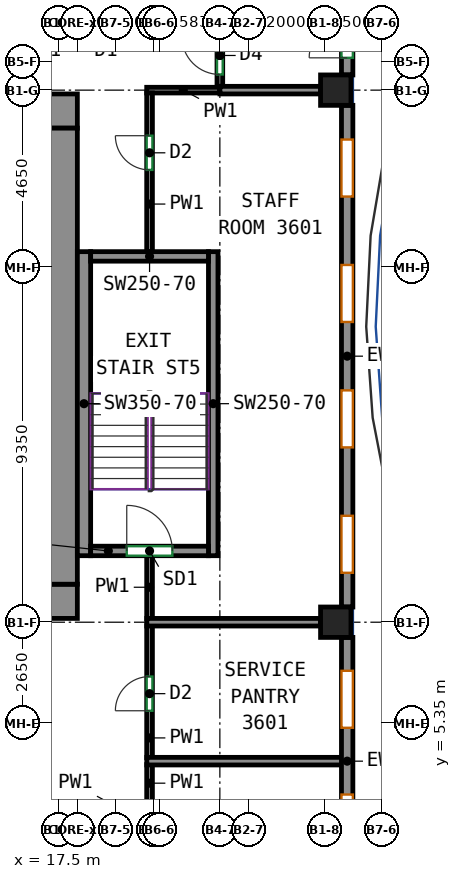
"""IFC4 building model, lengths in metres.
Left out: names, types, materials, properties, quantities, classifications, styles, units other than length and angle.
Written with IfcOpenShell. Run it as: python <this file> out.ifc"""

import sys

from ifc_helpers import new_model, si_unit, direction, frame, frame_2d, origin, origin_2d, place, context, subcontext, project, spatial, rectangle, extrude, source, transform, mapped, element, fill, save


model = new_model("IFC4")
c1 = context("Model", 3, precision=1e-05, world=origin(), true_north=direction((0.0, 1.0)))
c2 = subcontext(c1, "Body", "Model", "MODEL_VIEW")
j1 = project(units=[si_unit("LENGTHUNIT", "METRE"), si_unit("PLANEANGLEUNIT", "RADIAN")], contexts=[c1])
p1 = place(None, origin())
s1 = spatial("IfcSite", under=j1, at=p1, CompositionType="ELEMENT")
p2 = place(p1, origin())
s2 = spatial("IfcBuilding", under=s1, at=p2, CompositionType="ELEMENT")
p3 = place(p2, frame((0.0, 0.0, 157.5)))
s3 = spatial("IfcBuildingStorey", under=s2, at=p3, CompositionType="ELEMENT", Elevation=157.5)
m1 = source(origin(), c2, "Body", "SweptSolid", [
    extrude(rectangle(XDim=0.8, YDim=0.8, at=origin_2d()), origin(), (0.0, 0.0, 1.0), 3.12),
])
for number, where, z_axis, x_axis in (
    (1, (24.8, 8.0, 0.0), (0.0, 0.0, 1.0), (1.0, 0.0, 0.0)),
    (2, (24.8, 22.0, 0.0), (0.0, 0.0, 1.0), (1.0, 0.0, 0.0)),
):
    element("IfcColumn", number, at=place(p3, frame(where, z_axis=z_axis, x_axis=x_axis)), inside=s3, PredefinedType="COLUMN", context=c2, shape_type="MappedRepresentation", body=[
        mapped(m1, transform((0.0, 0.0, 0.0))),
    ])
m2 = source(origin(), c2, "Body", "SweptSolid", [
    extrude(rectangle(XDim=5.53, YDim=0.9, at=frame_2d((2.765, 0.0))), origin(), (0.0, 0.0, 1.0), 3.12),
])
p4 = place(p3, frame((12.47, 8.55, 0.0), z_axis=(0.0, 0.0, 1.0), x_axis=(1.0, 0.0, 0.0)))
e3 = element("IfcWall", 3, at=p4, inside=s3, PredefinedType="SHEAR", context=c2, shape_type="MappedRepresentation", body=[
    mapped(m2, transform((0.0, 0.0, 0.0))),
])
p5 = place(p4, frame((2.18, 0.0, 0.0)))
e4 = element("IfcOpeningElement", 4, at=p5, cuts=e3, PredefinedType="OPENING", context=c2, shape_type="SweptSolid", body=[
    extrude(rectangle(XDim=1.2, YDim=2.1, at=frame_2d((0.6, 1.05))), frame((0.0, 0.46, 0.0), z_axis=(0.0, -1.0, 0.0), x_axis=(1.0, 0.0, 0.0)), (0.0, 0.0, 1.0), 0.92),
])
m3 = source(origin(), c2, "Body", "SweptSolid", [
    extrude(rectangle(XDim=33.9, YDim=0.9, at=frame_2d((16.95, 0.0))), origin(), (0.0, 0.0, 1.0), 3.12),
])
p6 = place(p3, frame((-15.9, 21.45, 0.0), z_axis=(0.0, 0.0, 1.0), x_axis=(1.0, 0.0, 0.0)))
e5 = element("IfcWall", 5, at=p6, inside=s3, PredefinedType="SHEAR", context=c2, shape_type="MappedRepresentation", body=[
    mapped(m3, transform((0.0, 0.0, 0.0))),
])
p7 = place(p6, frame((8.42, 0.0, 0.0)))
e6 = element("IfcOpeningElement", 6, at=p7, cuts=e5, PredefinedType="OPENING", context=c2, shape_type="SweptSolid", body=[
    extrude(rectangle(XDim=0.9, YDim=2.1, at=frame_2d((0.45, 1.05))), frame((0.0, 0.46, 0.0), z_axis=(0.0, -1.0, 0.0), x_axis=(1.0, 0.0, 0.0)), (0.0, 0.0, 1.0), 0.92),
])
p8 = place(p6, frame((15.12, 0.0, 0.0)))
e7 = element("IfcOpeningElement", 7, at=p8, cuts=e5, PredefinedType="OPENING", context=c2, shape_type="SweptSolid", body=[
    extrude(rectangle(XDim=0.9, YDim=2.1, at=frame_2d((0.45, 1.05))), frame((0.0, 0.46, 0.0), z_axis=(0.0, -1.0, 0.0), x_axis=(1.0, 0.0, 0.0)), (0.0, 0.0, 1.0), 0.92),
])
p9 = place(p6, frame((19.944, 0.0, 0.0)))
e8 = element("IfcOpeningElement", 8, at=p9, cuts=e5, PredefinedType="OPENING", context=c2, shape_type="SweptSolid", body=[
    extrude(rectangle(XDim=0.9, YDim=2.1, at=frame_2d((0.45, 1.05))), frame((0.0, 0.46, 0.0), z_axis=(0.0, -1.0, 0.0), x_axis=(1.0, 0.0, 0.0)), (0.0, 0.0, 1.0), 0.92),
])
p10 = place(p6, frame((25.304, 0.0, 0.0)))
e9 = element("IfcOpeningElement", 9, at=p10, cuts=e5, PredefinedType="OPENING", context=c2, shape_type="SweptSolid", body=[
    extrude(rectangle(XDim=0.9, YDim=2.1, at=frame_2d((0.45, 1.05))), frame((0.0, 0.46, 0.0), z_axis=(0.0, -1.0, 0.0), x_axis=(1.0, 0.0, 0.0)), (0.0, 0.0, 1.0), 0.92),
])
p11 = place(p6, frame((2.425, 0.0, 0.0)))
e10 = element("IfcOpeningElement", 10, at=p11, cuts=e5, PredefinedType="OPENING", context=c2, shape_type="SweptSolid", body=[
    extrude(rectangle(XDim=0.9, YDim=2.1, at=frame_2d((0.45, 1.05))), frame((0.0, 0.46, 0.0), z_axis=(0.0, -1.0, 0.0), x_axis=(1.0, 0.0, 0.0)), (0.0, 0.0, 1.0), 0.92),
])
p12 = place(p6, frame((30.575, 0.0, 0.0)))
e11 = element("IfcOpeningElement", 11, at=p12, cuts=e5, PredefinedType="OPENING", context=c2, shape_type="SweptSolid", body=[
    extrude(rectangle(XDim=0.9, YDim=2.1, at=frame_2d((0.45, 1.05))), frame((0.0, 0.46, 0.0), z_axis=(0.0, -1.0, 0.0), x_axis=(1.0, 0.0, 0.0)), (0.0, 0.0, 1.0), 0.92),
])
m4 = source(origin(), c2, "Body", "SweptSolid", [
    extrude(rectangle(XDim=12.0, YDim=0.9, at=frame_2d((6.0, 0.0))), origin(), (0.0, 0.0, 1.0), 3.12),
])
p13 = place(p3, frame((17.55, 9.0, 0.0), z_axis=(0.0, 0.0, 1.0), x_axis=(0.0, 1.0, 0.0)))
e12 = element("IfcWall", 12, at=p13, inside=s3, PredefinedType="SHEAR", context=c2, shape_type="MappedRepresentation", body=[
    mapped(m4, transform((0.0, 0.0, 0.0))),
])
m5 = source(origin(), c2, "Body", "SweptSolid", [
    extrude(rectangle(XDim=8.0, YDim=0.35, at=frame_2d((4.0, 0.0))), origin(), (0.0, 0.0, 1.0), 3.12),
])
p14 = place(p3, frame((18.175, 9.75, 0.0), z_axis=(0.0, 0.0, 1.0), x_axis=(0.0, 1.0, 0.0)))
e13 = element("IfcWall", 13, at=p14, inside=s3, PredefinedType="SHEAR", context=c2, shape_type="MappedRepresentation", body=[
    mapped(m5, transform((0.0, 0.0, 0.0))),
])
m6 = source(origin(), c2, "Body", "SweptSolid", [
    extrude(rectangle(XDim=8.0, YDim=0.25, at=frame_2d((4.0, 0.0))), origin(), (0.0, 0.0, 1.0), 3.12),
])
p15 = place(p3, frame((21.575, 9.75, 0.0), z_axis=(0.0, 0.0, 1.0), x_axis=(0.0, 1.0, 0.0)))
e14 = element("IfcWall", 14, at=p15, inside=s3, PredefinedType="SHEAR", context=c2, shape_type="MappedRepresentation", body=[
    mapped(m6, transform((0.0, 0.0, 0.0))),
])
m7 = source(origin(), c2, "Body", "SweptSolid", [
    extrude(rectangle(XDim=3.1, YDim=0.25, at=frame_2d((1.55, 0.0))), origin(), (0.0, 0.0, 1.0), 3.12),
])
p16 = place(p3, frame((18.35, 9.875, 0.0), z_axis=(0.0, 0.0, 1.0), x_axis=(1.0, 0.0, 0.0)))
e15 = element("IfcWall", 15, at=p16, inside=s3, PredefinedType="SHEAR", context=c2, shape_type="MappedRepresentation", body=[
    mapped(m7, transform((0.0, 0.0, 0.0))),
])
p17 = place(p16, frame((0.95, 0.0, 0.0)))
e16 = element("IfcOpeningElement", 16, at=p17, cuts=e15, PredefinedType="OPENING", context=c2, shape_type="SweptSolid", body=[
    extrude(rectangle(XDim=1.2, YDim=2.1, at=frame_2d((0.6, 1.05))), frame((0.0, 0.135, 0.0), z_axis=(0.0, -1.0, 0.0), x_axis=(1.0, 0.0, 0.0)), (0.0, 0.0, 1.0), 0.27),
])
p18 = place(p3, frame((18.35, 17.625, 0.0), z_axis=(0.0, 0.0, 1.0), x_axis=(1.0, 0.0, 0.0)))
e17 = element("IfcWall", 17, at=p18, inside=s3, PredefinedType="SHEAR", context=c2, shape_type="MappedRepresentation", body=[
    mapped(m7, transform((0.0, 0.0, 0.0))),
])
m8 = source(origin(), c2, "Body", "SweptSolid", [
    extrude(rectangle(XDim=6.513, YDim=0.3, at=frame_2d((3.256, 0.0))), origin(), (0.0, 0.0, 1.0), 3.12),
])
p19 = place(p3, frame((25.1, 1.087, 0.0), z_axis=(0.0, 0.0, 1.0), x_axis=(0.0, 1.0, 0.0)))
e18 = element("IfcWall", 18, at=p19, inside=s3, PredefinedType="SOLIDWALL", context=c2, shape_type="MappedRepresentation", body=[
    mapped(m8, transform((0.0, 0.0, 0.0))),
])
p20 = place(p19, frame((0.878, 0.0, 0.85)))
e19 = element("IfcOpeningElement", 19, at=p20, cuts=e18, PredefinedType="OPENING", context=c2, shape_type="SweptSolid", body=[
    extrude(rectangle(XDim=1.5, YDim=1.95, at=frame_2d((0.75, 0.975))), frame((0.0, 0.16, 0.0), z_axis=(0.0, -1.0, 0.0), x_axis=(1.0, 0.0, 0.0)), (0.0, 0.0, 1.0), 0.32),
])
p21 = place(p19, frame((4.135, 0.0, 0.85)))
e20 = element("IfcOpeningElement", 20, at=p21, cuts=e18, PredefinedType="OPENING", context=c2, shape_type="SweptSolid", body=[
    extrude(rectangle(XDim=1.5, YDim=1.95, at=frame_2d((0.75, 0.975))), frame((0.0, 0.16, 0.0), z_axis=(0.0, -1.0, 0.0), x_axis=(1.0, 0.0, 0.0)), (0.0, 0.0, 1.0), 0.32),
])
m9 = source(origin(), c2, "Body", "SweptSolid", [
    extrude(rectangle(XDim=13.2, YDim=0.3, at=frame_2d((6.6, 0.0))), origin(), (0.0, 0.0, 1.0), 3.12),
])
p22 = place(p3, frame((25.1, 8.4, 0.0), z_axis=(0.0, 0.0, 1.0), x_axis=(0.0, 1.0, 0.0)))
e21 = element("IfcWall", 21, at=p22, inside=s3, PredefinedType="SOLIDWALL", context=c2, shape_type="MappedRepresentation", body=[
    mapped(m9, transform((0.0, 0.0, 0.0))),
])
p23 = place(p22, frame((0.9, 0.0, 0.85)))
e22 = element("IfcOpeningElement", 22, at=p23, cuts=e21, PredefinedType="OPENING", context=c2, shape_type="SweptSolid", body=[
    extrude(rectangle(XDim=1.5, YDim=1.95, at=frame_2d((0.75, 0.975))), frame((0.0, 0.16, 0.0), z_axis=(0.0, -1.0, 0.0), x_axis=(1.0, 0.0, 0.0)), (0.0, 0.0, 1.0), 0.32),
])
p24 = place(p22, frame((4.2, 0.0, 0.85)))
e23 = element("IfcOpeningElement", 23, at=p24, cuts=e21, PredefinedType="OPENING", context=c2, shape_type="SweptSolid", body=[
    extrude(rectangle(XDim=1.5, YDim=1.95, at=frame_2d((0.75, 0.975))), frame((0.0, 0.16, 0.0), z_axis=(0.0, -1.0, 0.0), x_axis=(1.0, 0.0, 0.0)), (0.0, 0.0, 1.0), 0.32),
])
p25 = place(p22, frame((7.5, 0.0, 0.85)))
e24 = element("IfcOpeningElement", 24, at=p25, cuts=e21, PredefinedType="OPENING", context=c2, shape_type="SweptSolid", body=[
    extrude(rectangle(XDim=1.5, YDim=1.95, at=frame_2d((0.75, 0.975))), frame((0.0, 0.16, 0.0), z_axis=(0.0, -1.0, 0.0), x_axis=(1.0, 0.0, 0.0)), (0.0, 0.0, 1.0), 0.32),
])
p26 = place(p22, frame((10.8, 0.0, 0.85)))
e25 = element("IfcOpeningElement", 25, at=p26, cuts=e21, PredefinedType="OPENING", context=c2, shape_type="SweptSolid", body=[
    extrude(rectangle(XDim=1.5, YDim=1.95, at=frame_2d((0.75, 0.975))), frame((0.0, 0.16, 0.0), z_axis=(0.0, -1.0, 0.0), x_axis=(1.0, 0.0, 0.0)), (0.0, 0.0, 1.0), 0.32),
])
m10 = source(origin(), c2, "Body", "SweptSolid", [
    extrude(rectangle(XDim=4.95, YDim=0.3, at=frame_2d((2.475, 0.0))), origin(), (0.0, 0.0, 1.0), 3.12),
])
p27 = place(p3, frame((25.1, 22.4, 0.0), z_axis=(0.0, 0.0, 1.0), x_axis=(0.0, 1.0, 0.0)))
e26 = element("IfcWall", 26, at=p27, inside=s3, PredefinedType="SOLIDWALL", context=c2, shape_type="MappedRepresentation", body=[
    mapped(m10, transform((0.0, 0.0, 0.0))),
])
p28 = place(p27, frame((1.75, 0.0, 0.85)))
e27 = element("IfcOpeningElement", 27, at=p28, cuts=e26, PredefinedType="OPENING", context=c2, shape_type="SweptSolid", body=[
    extrude(rectangle(XDim=1.5, YDim=1.95, at=frame_2d((0.75, 0.975))), frame((0.0, 0.16, 0.0), z_axis=(0.0, -1.0, 0.0), x_axis=(1.0, 0.0, 0.0)), (0.0, 0.0, 1.0), 0.32),
])
p29 = place(p27, frame((0.45, 0.0, 0.0)))
e28 = element("IfcOpeningElement", 28, at=p29, cuts=e26, PredefinedType="OPENING", context=c2, shape_type="SweptSolid", body=[
    extrude(rectangle(XDim=1.0, YDim=2.1, at=frame_2d((0.5, 1.05))), frame((0.0, 0.16, 0.0), z_axis=(0.0, -1.0, 0.0), x_axis=(1.0, 0.0, 0.0)), (0.0, 0.0, 1.0), 0.32),
])
p30 = place(p3, frame((21.75, 22.1, 0.0), z_axis=(0.0, 0.0, 1.0), x_axis=(0.0, 1.0, 0.0)))
e29 = element("IfcWall", 29, at=p30, inside=s3, PredefinedType="PARTITIONING", context=c2, shape_type="SweptSolid", body=[
    extrude(rectangle(XDim=1.625, YDim=0.15, at=frame_2d((0.812, 0.0))), origin(), (0.0, 0.0, 1.0), 3.12),
])
p31 = place(p30, frame((0.312, 0.0, 0.0)))
e30 = element("IfcOpeningElement", 30, at=p31, cuts=e29, PredefinedType="OPENING", context=c2, shape_type="SweptSolid", body=[
    extrude(rectangle(XDim=1.0, YDim=2.1, at=frame_2d((0.5, 1.05))), frame((0.0, 0.085, 0.0), z_axis=(0.0, -1.0, 0.0), x_axis=(1.0, 0.0, 0.0)), (0.0, 0.0, 1.0), 0.17),
])
p32 = place(p3, frame((19.9, 4.434, 0.0), z_axis=(0.0, 0.0, 1.0), x_axis=(0.0, 1.0, 0.0)))
e31 = element("IfcWall", 31, at=p32, inside=s3, PredefinedType="PARTITIONING", context=c2, shape_type="SweptSolid", body=[
    extrude(rectangle(XDim=3.476, YDim=0.15, at=frame_2d((1.738, 0.0))), origin(), (0.0, 0.0, 1.0), 3.12),
])
p33 = place(p32, frame((1.236, 0.0, 0.0)))
e32 = element("IfcOpeningElement", 32, at=p33, cuts=e31, PredefinedType="OPENING", context=c2, shape_type="SweptSolid", body=[
    extrude(rectangle(XDim=0.9, YDim=2.1, at=frame_2d((0.45, 1.05))), frame((0.0, 0.085, 0.0), z_axis=(0.0, -1.0, 0.0), x_axis=(1.0, 0.0, 0.0)), (0.0, 0.0, 1.0), 0.17),
])
p34 = place(p3, frame((19.825, 22.0, 0.0), z_axis=(0.0, 0.0, 1.0), x_axis=(1.0, 0.0, 0.0)))
e33 = element("IfcWall", 33, at=p34, inside=s3, PredefinedType="PARTITIONING", context=c2, shape_type="SweptSolid", body=[
    extrude(rectangle(XDim=1.925, YDim=0.15, at=frame_2d((0.962, 0.0))), origin(), (0.0, 0.0, 1.0), 3.12),
])
p35 = place(p3, frame((19.9, 17.75, 0.0), z_axis=(0.0, 0.0, 1.0), x_axis=(0.0, 1.0, 0.0)))
e34 = element("IfcWall", 34, at=p35, inside=s3, PredefinedType="PARTITIONING", context=c2, shape_type="SweptSolid", body=[
    extrude(rectangle(XDim=4.175, YDim=0.15, at=frame_2d((2.087, 0.0))), origin(), (0.0, 0.0, 1.0), 3.12),
])
p36 = place(p35, frame((2.151, 0.0, 0.0)))
e35 = element("IfcOpeningElement", 35, at=p36, cuts=e34, PredefinedType="OPENING", context=c2, shape_type="SweptSolid", body=[
    extrude(rectangle(XDim=0.9, YDim=2.1, at=frame_2d((0.45, 1.05))), frame((0.0, 0.085, 0.0), z_axis=(0.0, -1.0, 0.0), x_axis=(1.0, 0.0, 0.0)), (0.0, 0.0, 1.0), 0.17),
])
p37 = place(p3, frame((19.9, 8.09, 0.0), z_axis=(0.0, 0.0, 1.0), x_axis=(0.0, 1.0, 0.0)))
e36 = element("IfcWall", 36, at=p37, inside=s3, PredefinedType="PARTITIONING", context=c2, shape_type="SweptSolid", body=[
    extrude(rectangle(XDim=1.66, YDim=0.15, at=frame_2d((0.83, 0.0))), origin(), (0.0, 0.0, 1.0), 3.12),
])
p38 = place(p3, frame((19.9, 3.275, 0.0), z_axis=(0.0, 0.0, 1.0), x_axis=(0.0, 1.0, 0.0)))
e37 = element("IfcWall", 37, at=p38, inside=s3, PredefinedType="PARTITIONING", context=c2, shape_type="SweptSolid", body=[
    extrude(rectangle(XDim=0.979, YDim=0.15, at=frame_2d((0.49, 0.0))), origin(), (0.0, 0.0, 1.0), 3.12),
])
p39 = place(p3, frame((21.752, 22.0, 0.0), z_axis=(0.0, 0.0, 1.0), x_axis=(1.0, 0.0, 0.0)))
e38 = element("IfcWall", 38, at=p39, inside=s3, PredefinedType="PARTITIONING", context=c2, shape_type="SweptSolid", body=[
    extrude(rectangle(XDim=2.648, YDim=0.2, at=frame_2d((1.324, 0.0))), origin(), (0.0, 0.0, 1.0), 3.12),
])
p40 = place(p3, frame((19.827, 8.0, 0.0), z_axis=(0.0, 0.0, 1.0), x_axis=(1.0, 0.0, 0.0)))
e39 = element("IfcWall", 39, at=p40, inside=s3, PredefinedType="PARTITIONING", context=c2, shape_type="SweptSolid", body=[
    extrude(rectangle(XDim=4.573, YDim=0.2, at=frame_2d((2.287, 0.0))), origin(), (0.0, 0.0, 1.0), 3.12),
])
p41 = place(p3, frame((19.827, 4.344, 0.0), z_axis=(0.0, 0.0, 1.0), x_axis=(1.0, 0.0, 0.0)))
e40 = element("IfcWall", 40, at=p41, inside=s3, PredefinedType="PARTITIONING", context=c2, shape_type="SweptSolid", body=[
    extrude(rectangle(XDim=5.173, YDim=0.2, at=frame_2d((2.586, 0.0))), origin(), (0.0, 0.0, 1.0), 3.12),
])
p42 = place(p20, origin())
e41 = element("IfcWindow", 41, at=p42, inside=s3, PartitioningType="SINGLE_PANEL", PredefinedType="WINDOW", context=c2, shape_type="SweptSolid", body=[
    extrude(rectangle(XDim=1.5, YDim=1.95, at=frame_2d((0.75, 0.975))), frame((0.0, 0.03, 0.0), z_axis=(0.0, -1.0, 0.0), x_axis=(1.0, 0.0, 0.0)), (0.0, 0.0, 1.0), 0.06),
])
fill(e19, e41)
p43 = place(p21, origin())
e42 = element("IfcWindow", 42, at=p43, inside=s3, PartitioningType="SINGLE_PANEL", PredefinedType="WINDOW", context=c2, shape_type="SweptSolid", body=[
    extrude(rectangle(XDim=1.5, YDim=1.95, at=frame_2d((0.75, 0.975))), frame((0.0, 0.03, 0.0), z_axis=(0.0, -1.0, 0.0), x_axis=(1.0, 0.0, 0.0)), (0.0, 0.0, 1.0), 0.06),
])
fill(e20, e42)
p44 = place(p23, origin())
e43 = element("IfcWindow", 43, at=p44, inside=s3, PartitioningType="SINGLE_PANEL", PredefinedType="WINDOW", context=c2, shape_type="SweptSolid", body=[
    extrude(rectangle(XDim=1.5, YDim=1.95, at=frame_2d((0.75, 0.975))), frame((0.0, 0.03, 0.0), z_axis=(0.0, -1.0, 0.0), x_axis=(1.0, 0.0, 0.0)), (0.0, 0.0, 1.0), 0.06),
])
fill(e22, e43)
p45 = place(p24, origin())
e44 = element("IfcWindow", 44, at=p45, inside=s3, PartitioningType="SINGLE_PANEL", PredefinedType="WINDOW", context=c2, shape_type="SweptSolid", body=[
    extrude(rectangle(XDim=1.5, YDim=1.95, at=frame_2d((0.75, 0.975))), frame((0.0, 0.03, 0.0), z_axis=(0.0, -1.0, 0.0), x_axis=(1.0, 0.0, 0.0)), (0.0, 0.0, 1.0), 0.06),
])
fill(e23, e44)
p46 = place(p25, origin())
e45 = element("IfcWindow", 45, at=p46, inside=s3, PartitioningType="SINGLE_PANEL", PredefinedType="WINDOW", context=c2, shape_type="SweptSolid", body=[
    extrude(rectangle(XDim=1.5, YDim=1.95, at=frame_2d((0.75, 0.975))), frame((0.0, 0.03, 0.0), z_axis=(0.0, -1.0, 0.0), x_axis=(1.0, 0.0, 0.0)), (0.0, 0.0, 1.0), 0.06),
])
fill(e24, e45)
p47 = place(p26, origin())
e46 = element("IfcWindow", 46, at=p47, inside=s3, PartitioningType="SINGLE_PANEL", PredefinedType="WINDOW", context=c2, shape_type="SweptSolid", body=[
    extrude(rectangle(XDim=1.5, YDim=1.95, at=frame_2d((0.75, 0.975))), frame((0.0, 0.03, 0.0), z_axis=(0.0, -1.0, 0.0), x_axis=(1.0, 0.0, 0.0)), (0.0, 0.0, 1.0), 0.06),
])
fill(e25, e46)
p48 = place(p29, origin())
e47 = element("IfcDoor", 47, at=p48, inside=s3, OperationType="SINGLE_SWING_LEFT", PredefinedType="DOOR", context=c2, shape_type="SweptSolid", body=[
    extrude(rectangle(XDim=1.0, YDim=2.1, at=frame_2d((0.5, 1.05))), frame((0.0, 0.025, 0.0), z_axis=(0.0, -1.0, 0.0), x_axis=(1.0, 0.0, 0.0)), (0.0, 0.0, 1.0), 0.05),
])
fill(e28, e47)
p49 = place(p17, origin())
e48 = element("IfcDoor", 48, at=p49, inside=s3, OperationType="DOUBLE_DOOR_SINGLE_SWING", PredefinedType="DOOR", context=c2, shape_type="SweptSolid", body=[
    extrude(rectangle(XDim=1.2, YDim=2.1, at=frame_2d((0.6, 1.05))), frame((0.0, 0.025, 0.0), z_axis=(0.0, -1.0, 0.0), x_axis=(1.0, 0.0, 0.0)), (0.0, 0.0, 1.0), 0.05),
])
fill(e16, e48)
p50 = place(p33, origin())
e49 = element("IfcDoor", 49, at=p50, inside=s3, OperationType="SINGLE_SWING_LEFT", PredefinedType="DOOR", context=c2, shape_type="SweptSolid", body=[
    extrude(rectangle(XDim=0.9, YDim=2.1, at=frame_2d((0.45, 1.05))), frame((0.0, 0.025, 0.0), z_axis=(0.0, -1.0, 0.0), x_axis=(1.0, 0.0, 0.0)), (0.0, 0.0, 1.0), 0.05),
])
fill(e32, e49)
p51 = place(p36, origin())
e50 = element("IfcDoor", 50, at=p51, inside=s3, OperationType="SINGLE_SWING_RIGHT", PredefinedType="DOOR", context=c2, shape_type="SweptSolid", body=[
    extrude(rectangle(XDim=0.9, YDim=2.1, at=frame_2d((0.45, 1.05))), frame((0.0, 0.025, 0.0), z_axis=(0.0, -1.0, 0.0), x_axis=(1.0, 0.0, 0.0)), (0.0, 0.0, 1.0), 0.05),
])
fill(e35, e50)
p52 = place(p31, origin())
e51 = element("IfcDoor", 51, at=p52, inside=s3, OperationType="SINGLE_SWING_RIGHT", PredefinedType="DOOR", context=c2, shape_type="SweptSolid", body=[
    extrude(rectangle(XDim=1.0, YDim=2.1, at=frame_2d((0.5, 1.05))), frame((0.0, 0.025, 0.0), z_axis=(0.0, -1.0, 0.0), x_axis=(1.0, 0.0, 0.0)), (0.0, 0.0, 1.0), 0.05),
])
fill(e30, e51)
save(model, sys.argv[1])
